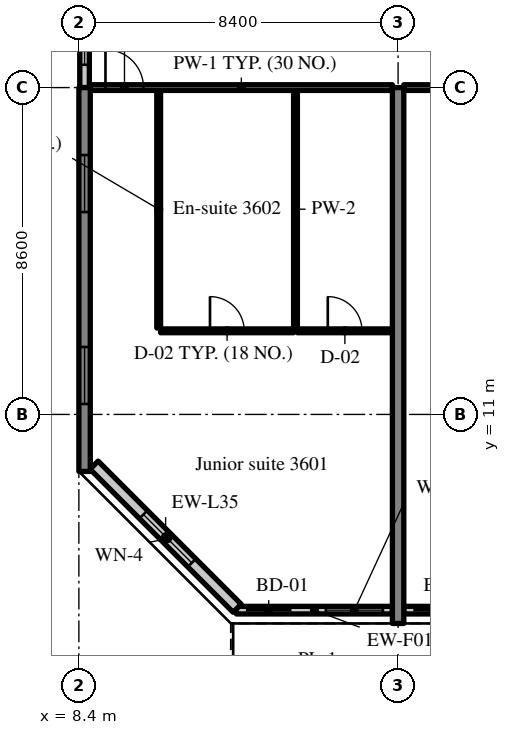
"""IFC4 building model, lengths in metres.
Left out: names, types, materials, properties, quantities, classifications, styles, units other than length and angle.
Written with IfcOpenShell. Run it as: python <this file> out.ifc"""

import sys

from ifc_helpers import new_model, si_unit, direction, frame, frame_2d, origin, place, context, subcontext, project, spatial, rectangle, extrude, source, transform, mapped, element, fill, save


model = new_model("IFC4")
c1 = context("Model", 3, precision=1e-05, world=origin(), true_north=direction((0.0, 1.0)))
c2 = subcontext(c1, "Body", "Model", "MODEL_VIEW")
j1 = project(units=[si_unit("LENGTHUNIT", "METRE"), si_unit("PLANEANGLEUNIT", "RADIAN")], contexts=[c1])
p1 = place(None, origin())
s1 = spatial("IfcSite", under=j1, at=p1, CompositionType="ELEMENT")
p2 = place(p1, origin())
s2 = spatial("IfcBuilding", under=s1, at=p2, CompositionType="ELEMENT")
p3 = place(p2, frame((0.0, 0.0, 151.6)))
s3 = spatial("IfcBuildingStorey", under=s2, at=p3, CompositionType="ELEMENT", Elevation=151.6)
m1 = source(origin(), c2, "Body", "SweptSolid", [
    extrude(rectangle(XDim=10.1, YDim=0.3, at=frame_2d((5.05, 0.0))), origin(), (0.0, 0.0, 1.0), 3.52),
])
p4 = place(p3, frame((8.55, 9.5, 0.0), z_axis=(0.0, 0.0, 1.0), x_axis=(0.0, 1.0, 0.0)))
e1 = element("IfcWall", 1, at=p4, inside=s3, PredefinedType="SHEAR", context=c2, shape_type="MappedRepresentation", body=[
    mapped(m1, transform((0.0, 0.0, 0.0), scale=1.0)),
])
m2 = source(origin(), c2, "Body", "SweptSolid", [
    extrude(rectangle(XDim=1.5, YDim=1.5, at=frame_2d((0.75, 0.75))), frame((0.0, 0.16, 0.0), z_axis=(0.0, -1.0, 0.0), x_axis=(1.0, 0.0, 0.0)), (0.0, 0.0, 1.0), 0.32),
])
p5 = place(p4, frame((1.775, 0.0, 0.9)))
e2 = element("IfcOpeningElement", 2, at=p5, cuts=e1, PredefinedType="OPENING", context=c2, shape_type="MappedRepresentation", body=[
    mapped(m2, transform((0.0, 0.0, 0.0), scale=1.0)),
])
p6 = place(p4, frame((6.825, 0.0, 0.9)))
e3 = element("IfcOpeningElement", 3, at=p6, cuts=e1, PredefinedType="OPENING", context=c2, shape_type="MappedRepresentation", body=[
    mapped(m2, transform((0.0, 0.0, 0.0), scale=1.0)),
])
m3 = source(origin(), c2, "Body", "SweptSolid", [
    extrude(rectangle(XDim=14.1, YDim=0.3, at=frame_2d((7.05, 0.0))), origin(), (0.0, 0.0, 1.0), 3.52),
])
p7 = place(p3, frame((16.8, 5.5, 0.0), z_axis=(0.0, 0.0, 1.0), x_axis=(0.0, 1.0, 0.0)))
e4 = element("IfcWall", 4, at=p7, inside=s3, PredefinedType="SHEAR", context=c2, shape_type="MappedRepresentation", body=[
    mapped(m3, transform((0.0, 0.0, 0.0), scale=1.0)),
])
m4 = source(origin(), c2, "Body", "SweptSolid", [
    extrude(rectangle(XDim=4.105, YDim=0.2, at=frame_2d((2.052, 0.0))), origin(), (0.0, 0.0, 1.0), 2.87),
])
p8 = place(p3, frame((12.545, 5.85, 0.0), z_axis=(0.0, 0.0, 1.0), x_axis=(1.0, 0.0, 0.0)))
e5 = element("IfcWall", 5, at=p8, inside=s3, PredefinedType="SOLIDWALL", context=c2, shape_type="MappedRepresentation", body=[
    mapped(m4, transform((0.0, 0.0, 0.0), scale=1.0)),
])
m5 = source(origin(), c2, "Body", "SweptSolid", [
    extrude(rectangle(XDim=1.2, YDim=2.4, at=frame_2d((0.6, 1.2))), frame((0.0, 0.11, 0.0), z_axis=(0.0, -1.0, 0.0), x_axis=(1.0, 0.0, 0.0)), (0.0, 0.0, 1.0), 0.22),
])
p9 = place(p8, frame((0.25, 0.0, 0.0)))
e6 = element("IfcOpeningElement", 6, at=p9, cuts=e5, PredefinedType="OPENING", context=c2, shape_type="MappedRepresentation", body=[
    mapped(m5, transform((0.0, 0.0, 0.0), scale=1.0)),
])
m6 = source(origin(), c2, "Body", "SweptSolid", [
    extrude(rectangle(XDim=1.5, YDim=1.5, at=frame_2d((0.75, 0.75))), frame((0.0, 0.11, 0.0), z_axis=(0.0, -1.0, 0.0), x_axis=(1.0, 0.0, 0.0)), (0.0, 0.0, 1.0), 0.22),
])
p10 = place(p8, frame((2.355, 0.0, 0.9)))
e7 = element("IfcOpeningElement", 7, at=p10, cuts=e5, PredefinedType="OPENING", context=c2, shape_type="MappedRepresentation", body=[
    mapped(m6, transform((0.0, 0.0, 0.0), scale=1.0)),
])
m7 = source(origin(), c2, "Body", "SweptSolid", [
    extrude(rectangle(XDim=8.1, YDim=0.2, at=frame_2d((4.05, 0.0))), origin(), (0.0, 0.0, 1.0), 2.87),
])
p11 = place(p3, frame((16.95, 5.85, 0.0), z_axis=(0.0, 0.0, 1.0), x_axis=(1.0, 0.0, 0.0)))
e8 = element("IfcWall", 8, at=p11, inside=s3, PredefinedType="SOLIDWALL", context=c2, shape_type="MappedRepresentation", body=[
    mapped(m7, transform((0.0, 0.0, 0.0), scale=1.0)),
])
p12 = place(p11, frame((0.25, 0.0, 0.0)))
e9 = element("IfcOpeningElement", 9, at=p12, cuts=e8, PredefinedType="OPENING", context=c2, shape_type="MappedRepresentation", body=[
    mapped(m5, transform((0.0, 0.0, 0.0), scale=1.0)),
])
p13 = place(p11, frame((2.3, 0.0, 0.9)))
e10 = element("IfcOpeningElement", 10, at=p13, cuts=e8, PredefinedType="OPENING", context=c2, shape_type="MappedRepresentation", body=[
    mapped(m6, transform((0.0, 0.0, 0.0), scale=1.0)),
])
p14 = place(p11, frame((4.3, 0.0, 0.0)))
e11 = element("IfcOpeningElement", 11, at=p14, cuts=e8, PredefinedType="OPENING", context=c2, shape_type="MappedRepresentation", body=[
    mapped(m5, transform((0.0, 0.0, 0.0), scale=1.0)),
])
p15 = place(p11, frame((6.35, 0.0, 0.9)))
e12 = element("IfcOpeningElement", 12, at=p15, cuts=e8, PredefinedType="OPENING", context=c2, shape_type="MappedRepresentation", body=[
    mapped(m6, transform((0.0, 0.0, 0.0), scale=1.0)),
])
m8 = source(origin(), c2, "Body", "SweptSolid", [
    extrude(rectangle(XDim=5.326, YDim=0.3, at=frame_2d((2.663, 0.0))), origin(), (0.0, 0.0, 1.0), 3.52),
])
p16 = place(p3, frame((8.8, 9.666, 0.0), z_axis=(0.0, 0.0, 1.0), x_axis=(0.707083859269, -0.707129702361, 0.0)))
e13 = element("IfcWall", 13, at=p16, inside=s3, PredefinedType="SOLIDWALL", context=c2, shape_type="MappedRepresentation", body=[
    mapped(m8, transform((0.0, 0.0, 0.0), scale=1.0)),
])
m9 = source(origin(), c2, "Body", "SweptSolid", [
    extrude(rectangle(XDim=1.8, YDim=1.5, at=frame_2d((0.9, 0.75))), frame((0.0, 0.16, 0.0), z_axis=(0.0, -1.0, 0.0), x_axis=(1.0, 0.0, 0.0)), (0.0, 0.0, 1.0), 0.32),
])
p17 = place(p16, frame((1.836, 0.0, 0.9)))
e14 = element("IfcOpeningElement", 14, at=p17, cuts=e13, PredefinedType="OPENING", context=c2, shape_type="MappedRepresentation", body=[
    mapped(m9, transform((0.0, 0.0, 0.0), scale=1.0)),
])
m10 = source(origin(), c2, "Body", "SweptSolid", [
    extrude(rectangle(XDim=2.4, YDim=0.25, at=frame_2d((1.2, 0.0))), origin(), (0.0, 0.0, 1.0), 2.62),
])
p18 = place(p3, frame((8.55, 19.6, 0.0), z_axis=(0.0, 0.0, 1.0), x_axis=(0.0, 1.0, 0.0)))
e15 = element("IfcWall", 15, at=p18, inside=s3, PredefinedType="SOLIDWALL", context=c2, shape_type="MappedRepresentation", body=[
    mapped(m10, transform((0.0, 0.0, 0.0), scale=1.0)),
])
m11 = source(origin(), c2, "Body", "SweptSolid", [
    extrude(rectangle(XDim=1.2, YDim=1.5, at=frame_2d((0.6, 0.75))), frame((0.0, 0.135, 0.0), z_axis=(0.0, -1.0, 0.0), x_axis=(1.0, 0.0, 0.0)), (0.0, 0.0, 1.0), 0.27),
])
p19 = place(p18, frame((0.6, 0.0, 0.9)))
e16 = element("IfcOpeningElement", 16, at=p19, cuts=e15, PredefinedType="OPENING", context=c2, shape_type="MappedRepresentation", body=[
    mapped(m11, transform((0.0, 0.0, 0.0), scale=1.0)),
])
m12 = source(origin(), c2, "Body", "SweptSolid", [
    extrude(rectangle(XDim=6.25, YDim=0.1, at=frame_2d((3.125, 0.0))), origin(), (0.0, 0.0, 1.0), 3.52),
])
for number, where, z_axis, x_axis in (
    (17, (10.5, 13.275, 0.0), (0.0, 0.0, 1.0), (0.0, 1.0, 0.0)),
    (18, (14.1, 13.275, 0.0), (0.0, 0.0, 1.0), (0.0, 1.0, 0.0)),
):
    element("IfcWall", number, at=place(p3, frame(where, z_axis=z_axis, x_axis=x_axis)), inside=s3, PredefinedType="PARTITIONING", context=c2, shape_type="MappedRepresentation", body=[
        mapped(m12, transform((0.0, 0.0, 0.0), scale=1.0)),
    ])
m13 = source(origin(), c2, "Body", "SweptSolid", [
    extrude(rectangle(XDim=3.5, YDim=0.1, at=frame_2d((1.75, 0.0))), origin(), (0.0, 0.0, 1.0), 3.52),
])
p20 = place(p3, frame((10.55, 13.2, 0.0), z_axis=(0.0, 0.0, 1.0), x_axis=(1.0, 0.0, 0.0)))
e19 = element("IfcWall", 19, at=p20, inside=s3, PredefinedType="PARTITIONING", context=c2, shape_type="MappedRepresentation", body=[
    mapped(m13, transform((0.0, 0.0, 0.0), scale=1.0)),
])
m14 = source(origin(), c2, "Body", "SweptSolid", [
    extrude(rectangle(XDim=0.9, YDim=2.1, at=frame_2d((0.45, 1.05))), frame((0.0, 0.06, 0.0), z_axis=(0.0, -1.0, 0.0), x_axis=(1.0, 0.0, 0.0)), (0.0, 0.0, 1.0), 0.12),
])
p21 = place(p20, frame((1.3, 0.0, 0.0)))
e20 = element("IfcOpeningElement", 20, at=p21, cuts=e19, PredefinedType="OPENING", context=c2, shape_type="MappedRepresentation", body=[
    mapped(m14, transform((0.0, 0.0, 0.0), scale=1.0)),
])
m15 = source(origin(), c2, "Body", "SweptSolid", [
    extrude(rectangle(XDim=2.5, YDim=0.1, at=frame_2d((1.25, 0.0))), origin(), (0.0, 0.0, 1.0), 3.52),
])
p22 = place(p3, frame((14.15, 13.2, 0.0), z_axis=(0.0, 0.0, 1.0), x_axis=(1.0, 0.0, 0.0)))
e21 = element("IfcWall", 21, at=p22, inside=s3, PredefinedType="PARTITIONING", context=c2, shape_type="MappedRepresentation", body=[
    mapped(m15, transform((0.0, 0.0, 0.0), scale=1.0)),
])
p23 = place(p22, frame((0.8, 0.0, 0.0)))
e22 = element("IfcOpeningElement", 22, at=p23, cuts=e21, PredefinedType="OPENING", context=c2, shape_type="MappedRepresentation", body=[
    mapped(m14, transform((0.0, 0.0, 0.0), scale=1.0)),
])
m16 = source(origin(), c2, "Body", "SweptSolid", [
    extrude(rectangle(XDim=7.95, YDim=0.15, at=frame_2d((3.975, 0.0))), origin(), (0.0, 0.0, 1.0), 2.82),
])
p24 = place(p3, frame((8.7, 19.6, 0.0), z_axis=(0.0, 0.0, 1.0), x_axis=(1.0, 0.0, 0.0)))
e23 = element("IfcWall", 23, at=p24, inside=s3, PredefinedType="PARTITIONING", context=c2, shape_type="MappedRepresentation", body=[
    mapped(m16, transform((0.0, 0.0, 0.0), scale=1.0)),
])
m17 = source(origin(), c2, "Body", "SweptSolid", [
    extrude(rectangle(XDim=1.0, YDim=2.1, at=frame_2d((0.5, 1.05))), frame((0.0, 0.085, 0.0), z_axis=(0.0, -1.0, 0.0), x_axis=(1.0, 0.0, 0.0)), (0.0, 0.0, 1.0), 0.17),
])
p25 = place(p24, frame((0.4, 0.0, 0.0)))
e24 = element("IfcOpeningElement", 24, at=p25, cuts=e23, PredefinedType="OPENING", context=c2, shape_type="MappedRepresentation", body=[
    mapped(m17, transform((0.0, 0.0, 0.0), scale=1.0)),
])
m18 = source(origin(), c2, "Body", "SweptSolid", [
    extrude(rectangle(XDim=8.1, YDim=0.15, at=frame_2d((4.05, 0.0))), origin(), (0.0, 0.0, 1.0), 2.82),
])
p26 = place(p3, frame((16.95, 19.6, 0.0), z_axis=(0.0, 0.0, 1.0), x_axis=(1.0, 0.0, 0.0)))
e25 = element("IfcWall", 25, at=p26, inside=s3, PredefinedType="PARTITIONING", context=c2, shape_type="MappedRepresentation", body=[
    mapped(m18, transform((0.0, 0.0, 0.0), scale=1.0)),
])
m19 = source(origin(), c2, "Body", "SweptSolid", [
    extrude(rectangle(XDim=1.8, YDim=2.1, at=frame_2d((0.9, 1.05))), frame((0.0, 0.085, 0.0), z_axis=(0.0, -1.0, 0.0), x_axis=(1.0, 0.0, 0.0)), (0.0, 0.0, 1.0), 0.17),
])
p27 = place(p26, frame((3.15, 0.0, 0.0)))
e26 = element("IfcOpeningElement", 26, at=p27, cuts=e25, PredefinedType="OPENING", context=c2, shape_type="MappedRepresentation", body=[
    mapped(m19, transform((0.0, 0.0, 0.0), scale=1.0)),
])
m20 = source(origin(), c2, "Body", "SweptSolid", [
    extrude(rectangle(XDim=1.2, YDim=2.4, at=frame_2d((0.6, 1.2))), frame((0.0, 0.025, 0.0), z_axis=(0.0, -1.0, 0.0), x_axis=(1.0, 0.0, 0.0)), (0.0, 0.0, 1.0), 0.05),
])
p28 = place(p9, origin())
e27 = element("IfcDoor", 27, at=p28, inside=s3, OperationType="SLIDING_TO_LEFT", PredefinedType="DOOR", context=c2, shape_type="MappedRepresentation", body=[
    mapped(m20, transform((0.0, 0.0, 0.0), scale=1.0)),
])
fill(e6, e27)
m21 = source(origin(), c2, "Body", "SweptSolid", [
    extrude(rectangle(XDim=1.5, YDim=1.5, at=frame_2d((0.75, 0.75))), frame((0.0, 0.03, 0.0), z_axis=(0.0, -1.0, 0.0), x_axis=(1.0, 0.0, 0.0)), (0.0, 0.0, 1.0), 0.06),
])
p29 = place(p10, origin())
e28 = element("IfcWindow", 28, at=p29, inside=s3, PartitioningType="SINGLE_PANEL", PredefinedType="WINDOW", context=c2, shape_type="MappedRepresentation", body=[
    mapped(m21, transform((0.0, 0.0, 0.0), scale=1.0)),
])
fill(e7, e28)
p30 = place(p12, origin())
e29 = element("IfcDoor", 29, at=p30, inside=s3, OperationType="SLIDING_TO_RIGHT", PredefinedType="DOOR", context=c2, shape_type="MappedRepresentation", body=[
    mapped(m20, transform((0.0, 0.0, 0.0), scale=1.0)),
])
fill(e9, e29)
m22 = source(origin(), c2, "Body", "SweptSolid", [
    extrude(rectangle(XDim=1.8, YDim=1.5, at=frame_2d((0.9, 0.75))), frame((0.0, 0.03, 0.0), z_axis=(0.0, -1.0, 0.0), x_axis=(1.0, 0.0, 0.0)), (0.0, 0.0, 1.0), 0.06),
])
p31 = place(p17, origin())
e30 = element("IfcWindow", 30, at=p31, inside=s3, PartitioningType="SINGLE_PANEL", PredefinedType="WINDOW", context=c2, shape_type="MappedRepresentation", body=[
    mapped(m22, transform((0.0, 0.0, 0.0), scale=1.0)),
])
fill(e14, e30)
p32 = place(p5, origin())
e31 = element("IfcWindow", 31, at=p32, inside=s3, PartitioningType="SINGLE_PANEL", PredefinedType="WINDOW", context=c2, shape_type="MappedRepresentation", body=[
    mapped(m21, transform((0.0, 0.0, 0.0), scale=1.0)),
])
fill(e2, e31)
p33 = place(p6, origin())
e32 = element("IfcWindow", 32, at=p33, inside=s3, PartitioningType="SINGLE_PANEL", PredefinedType="WINDOW", context=c2, shape_type="MappedRepresentation", body=[
    mapped(m21, transform((0.0, 0.0, 0.0), scale=1.0)),
])
fill(e3, e32)
m23 = source(origin(), c2, "Body", "SweptSolid", [
    extrude(rectangle(XDim=1.2, YDim=1.5, at=frame_2d((0.6, 0.75))), frame((0.0, 0.03, 0.0), z_axis=(0.0, -1.0, 0.0), x_axis=(1.0, 0.0, 0.0)), (0.0, 0.0, 1.0), 0.06),
])
p34 = place(p19, origin())
e33 = element("IfcWindow", 33, at=p34, inside=s3, PartitioningType="SINGLE_PANEL", PredefinedType="WINDOW", context=c2, shape_type="MappedRepresentation", body=[
    mapped(m23, transform((0.0, 0.0, 0.0), scale=1.0)),
])
fill(e16, e33)
m24 = source(origin(), c2, "Body", "SweptSolid", [
    extrude(rectangle(XDim=0.9, YDim=2.1, at=frame_2d((0.45, 1.05))), frame((0.0, 0.025, 0.0), z_axis=(0.0, -1.0, 0.0), x_axis=(1.0, 0.0, 0.0)), (0.0, 0.0, 1.0), 0.05),
])
p35 = place(p21, origin())
e34 = element("IfcDoor", 34, at=p35, inside=s3, OperationType="SINGLE_SWING_LEFT", PredefinedType="DOOR", context=c2, shape_type="MappedRepresentation", body=[
    mapped(m24, transform((0.0, 0.0, 0.0), scale=1.0)),
])
fill(e20, e34)
p36 = place(p23, origin())
e35 = element("IfcDoor", 35, at=p36, inside=s3, OperationType="SINGLE_SWING_LEFT", PredefinedType="DOOR", context=c2, shape_type="MappedRepresentation", body=[
    mapped(m24, transform((0.0, 0.0, 0.0), scale=1.0)),
])
fill(e22, e35)
m25 = source(origin(), c2, "Body", "SweptSolid", [
    extrude(rectangle(XDim=1.0, YDim=2.1, at=frame_2d((0.5, 1.05))), frame((0.0, 0.025, 0.0), z_axis=(0.0, -1.0, 0.0), x_axis=(1.0, 0.0, 0.0)), (0.0, 0.0, 1.0), 0.05),
])
p37 = place(p25, origin())
e36 = element("IfcDoor", 36, at=p37, inside=s3, OperationType="SINGLE_SWING_LEFT", PredefinedType="DOOR", context=c2, shape_type="MappedRepresentation", body=[
    mapped(m25, transform((0.0, 0.0, 0.0), scale=1.0)),
])
fill(e24, e36)
save(model, sys.argv[1])
